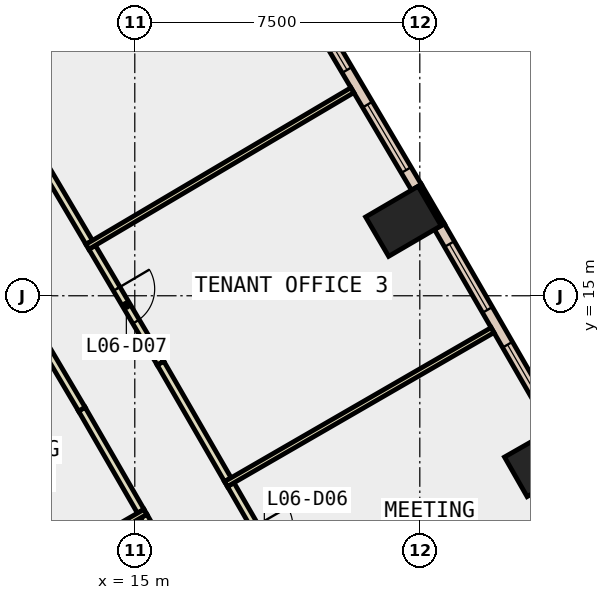
"""IFC4 building model, lengths in metres.
Left out: names, types, materials, properties, quantities, classifications, styles, units other than length and angle.
Written with IfcOpenShell. Run it as: python <this file> out.ifc"""

import sys

from ifc_helpers import new_model, si_unit, direction, frame, frame_2d, origin, origin_2d, place, context, subcontext, project, spatial, polyline, rectangle, outline, extrude, element, fill, save


model = new_model("IFC4")
c1 = context("Model", 3, precision=1e-05, world=origin(), true_north=direction((0.0, 1.0)))
c2 = subcontext(c1, "Body", "Model", "MODEL_VIEW")
j1 = project(units=[si_unit("LENGTHUNIT", "METRE"), si_unit("PLANEANGLEUNIT", "RADIAN")], contexts=[c1])
p1 = place(None, origin())
s1 = spatial("IfcSite", under=j1, at=p1, CompositionType="ELEMENT")
p2 = place(p1, origin())
s2 = spatial("IfcBuilding", under=s1, at=p2, CompositionType="ELEMENT")
p3 = place(p2, frame((0.0, 0.0, 35.0)))
s3 = spatial("IfcBuildingStorey", under=s2, at=p3, CompositionType="ELEMENT", Elevation=35.0)
for number, where, z_axis, x_axis in (
    (1, (25.721, 10.632, -0.6), (0.0, 0.0, 1.0), (-0.496, 0.869, 0.0)),
    (2, (22.068, 16.959, -0.6), (0.0, 0.0, 1.0), (-0.504, 0.864, 0.0)),
):
    element("IfcColumn", number, at=place(p3, frame(where, z_axis=z_axis, x_axis=x_axis)), inside=s3, PredefinedType="COLUMN", context=c2, shape_type="SweptSolid", body=[
        extrude(rectangle(XDim=1.2, YDim=1.6, at=origin_2d()), origin(), (0.0, 0.0, 1.0), 4.4),
    ])
p4 = place(p3, frame((0.0, 0.0, -0.6)))
e3 = element("IfcWall", 3, at=p4, inside=s3, PredefinedType="SHEAR", context=c2, shape_type="SweptSolid", body=[
    extrude(outline(polyline([(8.517, 11.748), (7.651, 11.248), (12.702, 2.5), (13.856, 2.5), (8.517, 11.748)])), origin(), (0.0, 0.0, 1.0), 4.4),
])
p5 = place(p3, frame((23.104, 16.87, 0.0), z_axis=(0.0, 0.0, 1.0), x_axis=(-0.504313844903, 0.863520437418, 0.0)))
e4 = element("IfcWall", 4, at=p5, inside=s3, PredefinedType="STANDARD", context=c2, shape_type="SweptSolid", body=[
    extrude(rectangle(XDim=1.2, YDim=0.1, at=frame_2d((0.6, 0.0))), origin(), (0.0, 0.0, 1.0), 3.8),
])
p6 = place(p3, frame((26.073, 11.522, 0.0), z_axis=(0.0, 0.0, 1.0), x_axis=(-0.499976985038, 0.866038691071, 0.0)))
e5 = element("IfcWall", 5, at=p6, inside=s3, PredefinedType="STANDARD", context=c2, shape_type="SweptSolid", body=[
    extrude(rectangle(XDim=6.116, YDim=0.3, at=frame_2d((3.058, 0.0))), origin(), (0.0, 0.0, 1.0), 3.8),
])
p7 = place(p6, frame((0.529, 0.0, 0.9)))
e6 = element("IfcOpeningElement", 6, at=p7, cuts=e5, PredefinedType="OPENING", context=c2, shape_type="SweptSolid", body=[
    extrude(rectangle(XDim=2.0, YDim=2.6, at=frame_2d((1.0, 1.3))), frame((0.0, 0.16, 0.0), z_axis=(0.0, -1.0, 0.0), x_axis=(1.0, 0.0, 0.0)), (0.0, 0.0, 1.0), 0.32),
])
p8 = place(p6, frame((3.587, 0.0, 0.9)))
e7 = element("IfcOpeningElement", 7, at=p8, cuts=e5, PredefinedType="OPENING", context=c2, shape_type="SweptSolid", body=[
    extrude(rectangle(XDim=2.0, YDim=2.6, at=frame_2d((1.0, 1.3))), frame((0.0, 0.16, 0.0), z_axis=(0.0, -1.0, 0.0), x_axis=(1.0, 0.0, 0.0)), (0.0, 0.0, 1.0), 0.32),
])
p9 = place(p3, frame((22.411, 17.853, 0.0), z_axis=(0.0, 0.0, 1.0), x_axis=(-0.508749483145, 0.860914608658, 0.0)))
e8 = element("IfcWall", 8, at=p9, inside=s3, PredefinedType="STANDARD", context=c2, shape_type="SweptSolid", body=[
    extrude(rectangle(XDim=6.117, YDim=0.3, at=frame_2d((3.058, 0.0))), origin(), (0.0, 0.0, 1.0), 3.8),
])
p10 = place(p9, frame((0.529, 0.0, 0.9)))
e9 = element("IfcOpeningElement", 9, at=p10, cuts=e8, PredefinedType="OPENING", context=c2, shape_type="SweptSolid", body=[
    extrude(rectangle(XDim=2.0, YDim=2.6, at=frame_2d((1.0, 1.3))), frame((0.0, 0.16, 0.0), z_axis=(0.0, -1.0, 0.0), x_axis=(1.0, 0.0, 0.0)), (0.0, 0.0, 1.0), 0.32),
])
p11 = place(p9, frame((3.588, 0.0, 0.9)))
e10 = element("IfcOpeningElement", 10, at=p11, cuts=e8, PredefinedType="OPENING", context=c2, shape_type="SweptSolid", body=[
    extrude(rectangle(XDim=2.0, YDim=2.6, at=frame_2d((1.0, 1.3))), frame((0.0, 0.16, 0.0), z_axis=(0.0, -1.0, 0.0), x_axis=(1.0, 0.0, 0.0)), (0.0, 0.0, 1.0), 0.32),
])
p12 = place(p3, frame((15.157, 9.33, 0.0), z_axis=(0.0, 0.0, 1.0), x_axis=(-0.500058580706, 0.865991579556, 0.0)))
e11 = element("IfcWall", 11, at=p12, inside=s3, PredefinedType="PARTITIONING", context=c2, shape_type="SweptSolid", body=[
    extrude(rectangle(XDim=3.102, YDim=0.2, at=frame_2d((1.551, 0.0))), origin(), (0.0, 0.0, 1.0), 3.8),
])
p13 = place(p3, frame((13.606, 12.016, 0.0), z_axis=(0.0, 0.0, 1.0), x_axis=(-0.508832553058, 0.860865513857, 0.0)))
e12 = element("IfcWall", 12, at=p13, inside=s3, PredefinedType="PARTITIONING", context=c2, shape_type="SweptSolid", body=[
    extrude(rectangle(XDim=1.912, YDim=0.2, at=frame_2d((0.956, 0.0))), origin(), (0.0, 0.0, 1.0), 3.8),
])
p14 = place(p3, frame((16.399, 7.178, 0.0), z_axis=(0.0, 0.0, 1.0), x_axis=(-0.499873332494, 0.866098522953, 0.0)))
e13 = element("IfcWall", 13, at=p14, inside=s3, PredefinedType="PARTITIONING", context=c2, shape_type="SweptSolid", body=[
    extrude(rectangle(XDim=2.334, YDim=0.2, at=frame_2d((1.167, 0.0))), origin(), (0.0, 0.0, 1.0), 3.8),
])
p15 = place(p3, frame((17.524, 10.031, 0.0), z_axis=(0.0, 0.0, 1.0), x_axis=(0.499861717316, -0.86610522661, 0.0)))
e14 = element("IfcWall", 14, at=p15, inside=s3, PredefinedType="PARTITIONING", context=c2, shape_type="SweptSolid", body=[
    extrude(rectangle(XDim=3.541, YDim=0.2, at=frame_2d((1.771, 0.0))), origin(), (0.0, 0.0, 1.0), 3.8),
])
p16 = place(p15, frame((1.27, 0.0, 0.0)))
e15 = element("IfcOpeningElement", 15, at=p16, cuts=e14, PredefinedType="OPENING", context=c2, shape_type="SweptSolid", body=[
    extrude(rectangle(XDim=1.0, YDim=2.1, at=frame_2d((0.5, 1.05))), frame((0.0, 0.11, 0.0), z_axis=(0.0, -1.0, 0.0), x_axis=(1.0, 0.0, 0.0)), (0.0, 0.0, 1.0), 0.22),
])
p17 = place(p3, frame((13.877, 16.275, 0.0), z_axis=(0.0, 0.0, 1.0), x_axis=(0.508613166028, -0.860995149431, 0.0)))
e16 = element("IfcWall", 16, at=p17, inside=s3, PredefinedType="PARTITIONING", context=c2, shape_type="SweptSolid", body=[
    extrude(rectangle(XDim=3.541, YDim=0.2, at=frame_2d((1.771, 0.0))), origin(), (0.0, 0.0, 1.0), 3.8),
])
p18 = place(p17, frame((1.271, 0.0, 0.0)))
e17 = element("IfcOpeningElement", 17, at=p18, cuts=e16, PredefinedType="OPENING", context=c2, shape_type="SweptSolid", body=[
    extrude(rectangle(XDim=1.0, YDim=2.1, at=frame_2d((0.5, 1.05))), frame((0.0, 0.11, 0.0), z_axis=(0.0, -1.0, 0.0), x_axis=(1.0, 0.0, 0.0)), (0.0, 0.0, 1.0), 0.22),
])
p19 = place(p3, frame((15.678, 13.226, 0.0), z_axis=(0.0, 0.0, 1.0), x_axis=(0.499951278228, -0.866053531485, 0.0)))
e18 = element("IfcWall", 18, at=p19, inside=s3, PredefinedType="PARTITIONING", context=c2, shape_type="SweptSolid", body=[
    extrude(rectangle(XDim=3.54, YDim=0.2, at=frame_2d((1.77, 0.0))), origin(), (0.0, 0.0, 1.0), 3.8),
])
p20 = place(p3, frame((11.998, 19.454, 0.0), z_axis=(0.0, 0.0, 1.0), x_axis=(0.508666621784, -0.860963569428, 0.0)))
e19 = element("IfcWall", 19, at=p20, inside=s3, PredefinedType="PARTITIONING", context=c2, shape_type="SweptSolid", body=[
    extrude(rectangle(XDim=3.542, YDim=0.2, at=frame_2d((1.771, 0.0))), origin(), (0.0, 0.0, 1.0), 3.8),
])
p21 = place(p3, frame((15.281, 9.315, 0.0), z_axis=(0.0, 0.0, 1.0), x_axis=(-0.86601742213, -0.500013824377, 0.0)))
e20 = element("IfcWall", 20, at=p21, inside=s3, PredefinedType="PARTITIONING", context=c2, shape_type="SweptSolid", body=[
    extrude(rectangle(XDim=4.642, YDim=0.15, at=frame_2d((2.321, 0.0))), origin(), (0.0, 0.0, 1.0), 3.8),
])
p22 = place(p3, frame((17.399, 10.045, 0.0), z_axis=(0.0, 0.0, 1.0), x_axis=(0.865980803489, 0.500077242023, 0.0)))
e21 = element("IfcWall", 21, at=p22, inside=s3, PredefinedType="PARTITIONING", context=c2, shape_type="SweptSolid", body=[
    extrude(rectangle(XDim=8.101, YDim=0.15, at=frame_2d((4.05, 0.0))), origin(), (0.0, 0.0, 1.0), 3.8),
])
p23 = place(p3, frame((13.752, 16.289, 0.0), z_axis=(0.0, 0.0, 1.0), x_axis=(0.86093852802, 0.508709004216, 0.0)))
e22 = element("IfcWall", 22, at=p23, inside=s3, PredefinedType="PARTITIONING", context=c2, shape_type="SweptSolid", body=[
    extrude(rectangle(XDim=8.101, YDim=0.15, at=frame_2d((4.05, 0.0))), origin(), (0.0, 0.0, 1.0), 3.8),
])
p24 = place(p7, origin())
e23 = element("IfcWindow", 23, at=p24, inside=s3, PartitioningType="SINGLE_PANEL", PredefinedType="WINDOW", context=c2, shape_type="SweptSolid", body=[
    extrude(rectangle(XDim=2.0, YDim=2.6, at=frame_2d((1.0, 1.3))), frame((0.0, 0.03, 0.0), z_axis=(0.0, -1.0, 0.0), x_axis=(1.0, 0.0, 0.0)), (0.0, 0.0, 1.0), 0.06),
])
fill(e6, e23)
p25 = place(p8, origin())
e24 = element("IfcWindow", 24, at=p25, inside=s3, PartitioningType="SINGLE_PANEL", PredefinedType="WINDOW", context=c2, shape_type="SweptSolid", body=[
    extrude(rectangle(XDim=2.0, YDim=2.6, at=frame_2d((1.0, 1.3))), frame((0.0, 0.03, 0.0), z_axis=(0.0, -1.0, 0.0), x_axis=(1.0, 0.0, 0.0)), (0.0, 0.0, 1.0), 0.06),
])
fill(e7, e24)
p26 = place(p10, origin())
e25 = element("IfcWindow", 25, at=p26, inside=s3, PartitioningType="SINGLE_PANEL", PredefinedType="WINDOW", context=c2, shape_type="SweptSolid", body=[
    extrude(rectangle(XDim=2.0, YDim=2.6, at=frame_2d((1.0, 1.3))), frame((0.0, 0.03, 0.0), z_axis=(0.0, -1.0, 0.0), x_axis=(1.0, 0.0, 0.0)), (0.0, 0.0, 1.0), 0.06),
])
fill(e9, e25)
p27 = place(p11, origin())
e26 = element("IfcWindow", 26, at=p27, inside=s3, PartitioningType="SINGLE_PANEL", PredefinedType="WINDOW", context=c2, shape_type="SweptSolid", body=[
    extrude(rectangle(XDim=2.0, YDim=2.6, at=frame_2d((1.0, 1.3))), frame((0.0, 0.03, 0.0), z_axis=(0.0, -1.0, 0.0), x_axis=(1.0, 0.0, 0.0)), (0.0, 0.0, 1.0), 0.06),
])
fill(e10, e26)
p28 = place(p18, origin())
e27 = element("IfcDoor", 27, at=p28, inside=s3, OperationType="SINGLE_SWING_LEFT", PredefinedType="DOOR", context=c2, shape_type="SweptSolid", body=[
    extrude(rectangle(XDim=1.0, YDim=2.1, at=frame_2d((0.5, 1.05))), frame((0.0, 0.025, 0.0), z_axis=(0.0, -1.0, 0.0), x_axis=(1.0, 0.0, 0.0)), (0.0, 0.0, 1.0), 0.05),
])
fill(e17, e27)
save(model, sys.argv[1])
